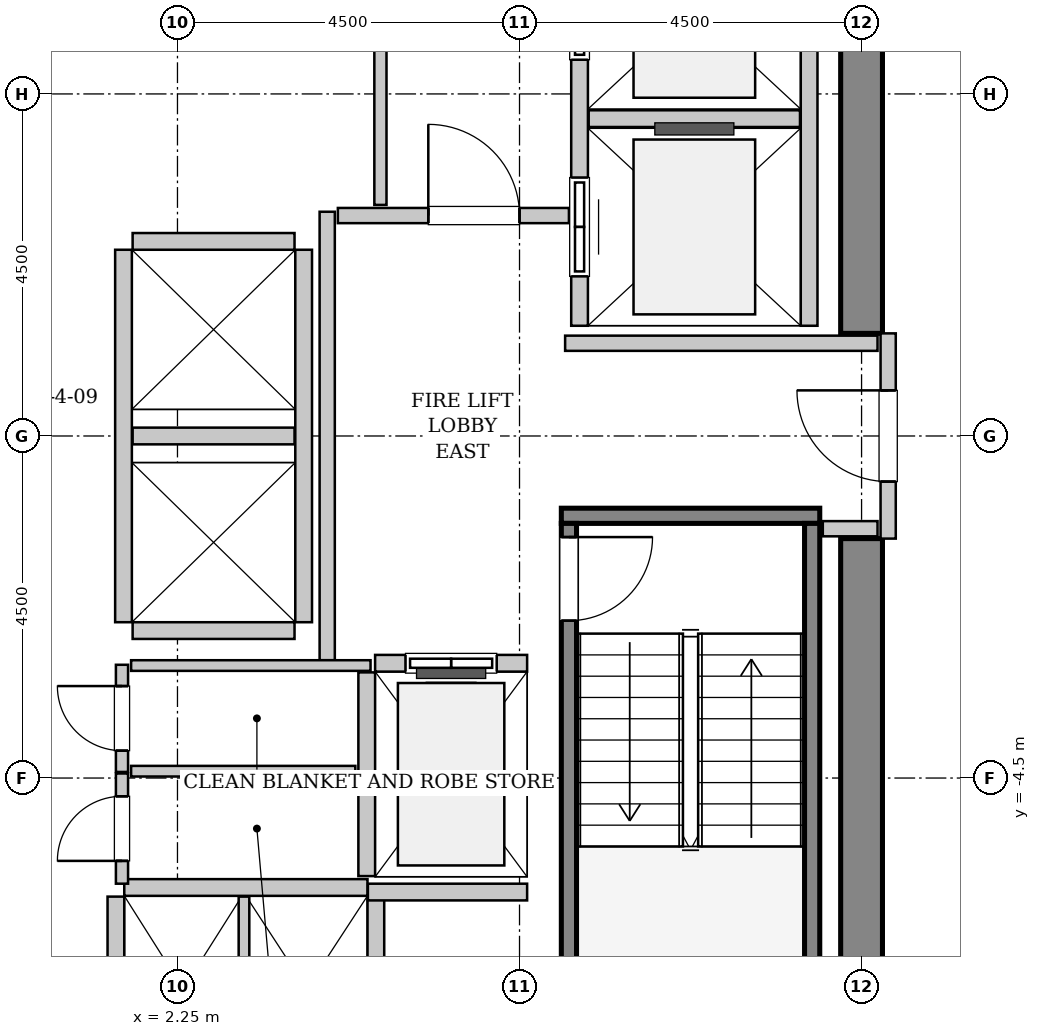
"""IFC4 building model, lengths in metres.
Left out: names, types, materials, properties, quantities, classifications, styles, units other than length and angle.
Written with IfcOpenShell. Run it as: python <this file> out.ifc"""

import sys

from ifc_helpers import new_model, si_unit, direction, frame, frame_2d, origin, place, context, subcontext, project, spatial, rectangle, extrude, source, transform, mapped, element, fill, save


model = new_model("IFC4")
c1 = context("Model", 3, precision=1e-05, world=origin(), true_north=direction((0.0, 1.0)))
c2 = subcontext(c1, "Body", "Model", "MODEL_VIEW")
j1 = project(units=[si_unit("LENGTHUNIT", "METRE"), si_unit("PLANEANGLEUNIT", "RADIAN")], contexts=[c1])
p1 = place(None, origin())
s1 = spatial("IfcSite", under=j1, at=p1, CompositionType="ELEMENT")
p2 = place(p1, origin())
s2 = spatial("IfcBuilding", under=s1, at=p2, CompositionType="ELEMENT")
p3 = place(p2, frame((0.0, 0.0, 94.6)))
s3 = spatial("IfcBuildingStorey", under=s2, at=p3, CompositionType="ELEMENT", Elevation=94.6)
m1 = source(origin(), c2, "Body", "SweptSolid", [
    extrude(rectangle(XDim=7.375, YDim=0.55, at=frame_2d((3.688, 0.0))), origin(), (0.0, 0.0, 1.0), 3.8),
])
for number, where, z_axis, x_axis in (
    (1, (11.25, -8.725, 0.0), (0.0, 0.0, 1.0), (0.0, 1.0, 0.0)),
    (2, (11.25, 1.35, 0.0), (0.0, 0.0, 1.0), (0.0, 1.0, 0.0)),
):
    element("IfcWall", number, at=place(p3, frame(where, z_axis=z_axis, x_axis=x_axis)), inside=s3, PredefinedType="SHEAR", context=c2, shape_type="MappedRepresentation", body=[
        mapped(m1, transform((0.0, 0.0, 0.0), x_axis=(1.0, 0.0, 0.0), y_axis=(0.0, 1.0, 0.0), z_axis=(0.0, 0.0, 1.0), scale=1.0)),
    ])
m2 = source(origin(), c2, "Body", "SweptSolid", [
    extrude(rectangle(XDim=3.4, YDim=0.2, at=frame_2d((1.7, 0.0))), origin(), (0.0, 0.0, 1.0), 3.8),
])
p4 = place(p3, frame((7.3, -1.05, 0.0), z_axis=(0.0, 0.0, 1.0), x_axis=(1.0, 0.0, 0.0)))
e3 = element("IfcWall", 3, at=p4, inside=s3, PredefinedType="SOLIDWALL", context=c2, shape_type="MappedRepresentation", body=[
    mapped(m2, transform((0.0, 0.0, 0.0), x_axis=(1.0, 0.0, 0.0), y_axis=(0.0, 1.0, 0.0), z_axis=(0.0, 0.0, 1.0), scale=1.0)),
])
m3 = source(origin(), c2, "Body", "SweptSolid", [
    extrude(rectangle(XDim=7.1, YDim=0.2, at=frame_2d((3.55, 0.0))), origin(), (0.0, 0.0, 1.0), 3.8),
])
p5 = place(p3, frame((7.4, -1.15, 0.0), z_axis=(0.0, 0.0, 1.0), x_axis=(0.0, -1.0, 0.0)))
e4 = element("IfcWall", 4, at=p5, inside=s3, PredefinedType="SOLIDWALL", context=c2, shape_type="MappedRepresentation", body=[
    mapped(m3, transform((0.0, 0.0, 0.0), x_axis=(1.0, 0.0, 0.0), y_axis=(0.0, 1.0, 0.0), z_axis=(0.0, 0.0, 1.0), scale=1.0)),
])
p6 = place(p5, frame((0.18, 0.0, 0.0)))
e5 = element("IfcOpeningElement", 5, at=p6, cuts=e4, PredefinedType="OPENING", context=c2, shape_type="SweptSolid", body=[
    extrude(rectangle(XDim=1.1, YDim=2.15, at=frame_2d((0.55, 1.075))), frame((0.0, 0.11, 0.0), z_axis=(0.0, -1.0, 0.0), x_axis=(1.0, 0.0, 0.0)), (0.0, 0.0, 1.0), 0.22),
])
p7 = place(p3, frame((10.6, -1.15, 0.0), z_axis=(0.0, 0.0, 1.0), x_axis=(0.0, -1.0, 0.0)))
e6 = element("IfcWall", 6, at=p7, inside=s3, PredefinedType="SOLIDWALL", context=c2, shape_type="MappedRepresentation", body=[
    mapped(m3, transform((0.0, 0.0, 0.0), x_axis=(1.0, 0.0, 0.0), y_axis=(0.0, 1.0, 0.0), z_axis=(0.0, 0.0, 1.0), scale=1.0)),
])
m4 = source(origin(), c2, "Body", "SweptSolid", [
    extrude(rectangle(XDim=2.0, YDim=0.22, at=frame_2d((1.0, 0.0))), origin(), (0.0, 0.0, 1.0), 3.535),
])
p8 = place(p3, frame((6.85, -2.99, 0.0), z_axis=(0.0, 0.0, 1.0), x_axis=(-1.0, 0.0, 0.0)))
e7 = element("IfcWall", 7, at=p8, inside=s3, PredefinedType="SOLIDWALL", context=c2, shape_type="MappedRepresentation", body=[
    mapped(m4, transform((0.0, 0.0, 0.0), x_axis=(1.0, 0.0, 0.0), y_axis=(0.0, 1.0, 0.0), z_axis=(0.0, 0.0, 1.0), scale=1.0)),
])
p9 = place(p8, frame((0.4, 0.0, 0.0)))
e8 = element("IfcOpeningElement", 8, at=p9, cuts=e7, PredefinedType="OPENING", context=c2, shape_type="SweptSolid", body=[
    extrude(rectangle(XDim=1.2, YDim=2.2, at=frame_2d((0.6, 1.1))), frame((0.0, 0.12, 0.0), z_axis=(0.0, -1.0, 0.0), x_axis=(1.0, 0.0, 0.0)), (0.0, 0.0, 1.0), 0.24),
])
m5 = source(origin(), c2, "Body", "SweptSolid", [
    extrude(rectangle(XDim=2.68, YDim=0.22, at=frame_2d((1.34, 0.0))), origin(), (0.0, 0.0, 1.0), 3.535),
])
p10 = place(p3, frame((4.74, -3.11, 0.0), z_axis=(0.0, 0.0, 1.0), x_axis=(0.0, -1.0, 0.0)))
e9 = element("IfcWall", 9, at=p10, inside=s3, PredefinedType="SOLIDWALL", context=c2, shape_type="MappedRepresentation", body=[
    mapped(m5, transform((0.0, 0.0, 0.0), x_axis=(1.0, 0.0, 0.0), y_axis=(0.0, 1.0, 0.0), z_axis=(0.0, 0.0, 1.0), scale=1.0)),
])
m6 = source(origin(), c2, "Body", "SweptSolid", [
    extrude(rectangle(XDim=5.45, YDim=0.22, at=frame_2d((2.725, 0.0))), origin(), (0.0, 0.0, 1.0), 3.535),
])
p11 = place(p3, frame((7.54, 6.9, 0.0), z_axis=(0.0, 0.0, 1.0), x_axis=(0.0, -1.0, 0.0)))
e10 = element("IfcWall", 10, at=p11, inside=s3, PredefinedType="SOLIDWALL", context=c2, shape_type="MappedRepresentation", body=[
    mapped(m6, transform((0.0, 0.0, 0.0), x_axis=(1.0, 0.0, 0.0), y_axis=(0.0, 1.0, 0.0), z_axis=(0.0, 0.0, 1.0), scale=1.0)),
])
p12 = place(p11, frame((3.5, 0.0, 0.0)))
e11 = element("IfcOpeningElement", 11, at=p12, cuts=e10, PredefinedType="OPENING", context=c2, shape_type="SweptSolid", body=[
    extrude(rectangle(XDim=1.3, YDim=2.3, at=frame_2d((0.65, 1.15))), frame((0.0, 0.12, 0.0), z_axis=(0.0, -1.0, 0.0), x_axis=(1.0, 0.0, 0.0)), (0.0, 0.0, 1.0), 0.24),
])
p13 = place(p11, frame((0.65, 0.0, 0.0)))
e12 = element("IfcOpeningElement", 12, at=p13, cuts=e10, PredefinedType="OPENING", context=c2, shape_type="SweptSolid", body=[
    extrude(rectangle(XDim=1.3, YDim=2.3, at=frame_2d((0.65, 1.15))), frame((0.0, 0.12, 0.0), z_axis=(0.0, -1.0, 0.0), x_axis=(1.0, 0.0, 0.0)), (0.0, 0.0, 1.0), 0.24),
])
p14 = place(p3, frame((10.56, 1.45, 0.0), z_axis=(0.0, 0.0, 1.0), x_axis=(0.0, 1.0, 0.0)))
e13 = element("IfcWall", 13, at=p14, inside=s3, PredefinedType="SOLIDWALL", context=c2, shape_type="MappedRepresentation", body=[
    mapped(m6, transform((0.0, 0.0, 0.0), x_axis=(1.0, 0.0, 0.0), y_axis=(0.0, 1.0, 0.0), z_axis=(0.0, 0.0, 1.0), scale=1.0)),
])
m7 = source(origin(), c2, "Body", "SweptSolid", [
    extrude(rectangle(XDim=2.78, YDim=0.22, at=frame_2d((1.39, 0.0))), origin(), (0.0, 0.0, 1.0), 3.535),
])
p15 = place(p3, frame((7.66, 4.175, 0.0), z_axis=(0.0, 0.0, 1.0), x_axis=(1.0, 0.0, 0.0)))
e14 = element("IfcWall", 14, at=p15, inside=s3, PredefinedType="SOLIDWALL", context=c2, shape_type="MappedRepresentation", body=[
    mapped(m7, transform((0.0, 0.0, 0.0), x_axis=(1.0, 0.0, 0.0), y_axis=(0.0, 1.0, 0.0), z_axis=(0.0, 0.0, 1.0), scale=1.0)),
])
m8 = source(origin(), c2, "Body", "SweptSolid", [
    extrude(rectangle(XDim=3.2, YDim=0.22, at=frame_2d((1.6, 0.0))), origin(), (0.0, 0.0, 1.0), 3.535),
])
p16 = place(p3, frame((4.75, -5.94, 0.0), z_axis=(0.0, 0.0, 1.0), x_axis=(-1.0, 0.0, 0.0)))
e15 = element("IfcWall", 15, at=p16, inside=s3, PredefinedType="SOLIDWALL", context=c2, shape_type="MappedRepresentation", body=[
    mapped(m8, transform((0.0, 0.0, 0.0), x_axis=(1.0, 0.0, 0.0), y_axis=(0.0, 1.0, 0.0), z_axis=(0.0, 0.0, 1.0), scale=1.0)),
])
m9 = source(origin(), c2, "Body", "SweptSolid", [
    extrude(rectangle(XDim=2.43, YDim=0.22, at=frame_2d((1.215, 0.0))), origin(), (0.0, 0.0, 1.0), 3.535),
])
p17 = place(p3, frame((1.44, -6.06, 0.0), z_axis=(0.0, 0.0, 1.0), x_axis=(0.0, -1.0, 0.0)))
e16 = element("IfcWall", 16, at=p17, inside=s3, PredefinedType="SOLIDWALL", context=c2, shape_type="MappedRepresentation", body=[
    mapped(m9, transform((0.0, 0.0, 0.0), x_axis=(1.0, 0.0, 0.0), y_axis=(0.0, 1.0, 0.0), z_axis=(0.0, 0.0, 1.0), scale=1.0)),
])
m10 = source(origin(), c2, "Body", "SweptSolid", [
    extrude(rectangle(XDim=2.43, YDim=0.14, at=frame_2d((1.215, 0.0))), origin(), (0.0, 0.0, 1.0), 3.535),
])
p18 = place(p3, frame((3.125, -8.49, 0.0), z_axis=(0.0, 0.0, 1.0), x_axis=(0.0, 1.0, 0.0)))
e17 = element("IfcWall", 17, at=p18, inside=s3, PredefinedType="PARTITIONING", context=c2, shape_type="MappedRepresentation", body=[
    mapped(m10, transform((0.0, 0.0, 0.0), x_axis=(1.0, 0.0, 0.0), y_axis=(0.0, 1.0, 0.0), z_axis=(0.0, 0.0, 1.0), scale=1.0)),
])
p19 = place(p3, frame((4.86, -8.49, 0.0), z_axis=(0.0, 0.0, 1.0), x_axis=(0.0, 1.0, 0.0)))
e18 = element("IfcWall", 18, at=p19, inside=s3, PredefinedType="SOLIDWALL", context=c2, shape_type="MappedRepresentation", body=[
    mapped(m9, transform((0.0, 0.0, 0.0), x_axis=(1.0, 0.0, 0.0), y_axis=(0.0, 1.0, 0.0), z_axis=(0.0, 0.0, 1.0), scale=1.0)),
])
m11 = source(origin(), c2, "Body", "SweptSolid", [
    extrude(rectangle(XDim=4.9, YDim=0.22, at=frame_2d((2.45, 0.0))), origin(), (0.0, 0.0, 1.0), 3.535),
])
for number, where, z_axis, x_axis in (
    (19, (1.54, 2.45, 0.0), (0.0, 0.0, 1.0), (0.0, -1.0, 0.0)),
    (20, (3.91, -2.45, 0.0), (0.0, 0.0, 1.0), (0.0, 1.0, 0.0)),
):
    element("IfcWall", number, at=place(p3, frame(where, z_axis=z_axis, x_axis=x_axis)), inside=s3, PredefinedType="SOLIDWALL", context=c2, shape_type="MappedRepresentation", body=[
        mapped(m11, transform((0.0, 0.0, 0.0), x_axis=(1.0, 0.0, 0.0), y_axis=(0.0, 1.0, 0.0), z_axis=(0.0, 0.0, 1.0), scale=1.0)),
    ])
m12 = source(origin(), c2, "Body", "SweptSolid", [
    extrude(rectangle(XDim=2.13, YDim=0.22, at=frame_2d((1.065, 0.0))), origin(), (0.0, 0.0, 1.0), 3.535),
])
for number, where, z_axis, x_axis in (
    (21, (1.66, -2.56, 0.0), (0.0, 0.0, 1.0), (1.0, 0.0, 0.0)),
    (22, (1.66, 0.0, 0.0), (0.0, 0.0, 1.0), (1.0, 0.0, 0.0)),
    (23, (3.79, 2.56, 0.0), (0.0, 0.0, 1.0), (-1.0, 0.0, 0.0)),
):
    element("IfcWall", number, at=place(p3, frame(where, z_axis=z_axis, x_axis=x_axis)), inside=s3, PredefinedType="SOLIDWALL", context=c2, shape_type="MappedRepresentation", body=[
        mapped(m12, transform((0.0, 0.0, 0.0), x_axis=(1.0, 0.0, 0.0), y_axis=(0.0, 1.0, 0.0), z_axis=(0.0, 0.0, 1.0), scale=1.0)),
    ])
m13 = source(origin(), c2, "Body", "SweptSolid", [
    extrude(rectangle(XDim=2.095, YDim=0.22, at=frame_2d((1.048, 0.0))), origin(), (0.0, 0.0, 1.0), 3.535),
])
p20 = place(p3, frame((4.755, -6.0, 0.0), z_axis=(0.0, 0.0, 1.0), x_axis=(1.0, 0.0, 0.0)))
e24 = element("IfcWall", 24, at=p20, inside=s3, PredefinedType="SOLIDWALL", context=c2, shape_type="MappedRepresentation", body=[
    mapped(m13, transform((0.0, 0.0, 0.0), x_axis=(1.0, 0.0, 0.0), y_axis=(0.0, 1.0, 0.0), z_axis=(0.0, 0.0, 1.0), scale=1.0)),
])
m14 = source(origin(), c2, "Body", "SweptSolid", [
    extrude(rectangle(XDim=2.7, YDim=0.2, at=frame_2d((1.35, 0.0))), origin(), (0.0, 0.0, 1.0), 2.425),
])
p21 = place(p3, frame((11.6, -1.35, 0.0), z_axis=(0.0, 0.0, 1.0), x_axis=(0.0, 1.0, 0.0)))
e25 = element("IfcWall", 25, at=p21, inside=s3, PredefinedType="PARTITIONING", context=c2, shape_type="MappedRepresentation", body=[
    mapped(m14, transform((0.0, 0.0, 0.0), x_axis=(1.0, 0.0, 0.0), y_axis=(0.0, 1.0, 0.0), z_axis=(0.0, 0.0, 1.0), scale=1.0)),
])
p22 = place(p21, frame((0.75, 0.0, 0.0)))
e26 = element("IfcOpeningElement", 26, at=p22, cuts=e25, PredefinedType="OPENING", context=c2, shape_type="SweptSolid", body=[
    extrude(rectangle(XDim=1.2, YDim=2.15, at=frame_2d((0.6, 1.075))), frame((0.0, 0.11, 0.0), z_axis=(0.0, -1.0, 0.0), x_axis=(1.0, 0.0, 0.0)), (0.0, 0.0, 1.0), 0.22),
])
m15 = source(origin(), c2, "Body", "SweptSolid", [
    extrude(rectangle(XDim=5.9, YDim=0.2, at=frame_2d((2.95, 0.0))), origin(), (0.0, 0.0, 1.0), 3.535),
])
p23 = place(p3, frame((4.22, -2.95, 0.0), z_axis=(0.0, 0.0, 1.0), x_axis=(0.0, 1.0, 0.0)))
e27 = element("IfcWall", 27, at=p23, inside=s3, PredefinedType="PARTITIONING", context=c2, shape_type="MappedRepresentation", body=[
    mapped(m15, transform((0.0, 0.0, 0.0), x_axis=(1.0, 0.0, 0.0), y_axis=(0.0, 1.0, 0.0), z_axis=(0.0, 0.0, 1.0), scale=1.0)),
])
m16 = source(origin(), c2, "Body", "SweptSolid", [
    extrude(rectangle(XDim=3.04, YDim=0.2, at=frame_2d((1.52, 0.0))), origin(), (0.0, 0.0, 1.0), 3.535),
])
p24 = place(p3, frame((4.36, 2.9, 0.0), z_axis=(0.0, 0.0, 1.0), x_axis=(1.0, 0.0, 0.0)))
e28 = element("IfcWall", 28, at=p24, inside=s3, PredefinedType="PARTITIONING", context=c2, shape_type="MappedRepresentation", body=[
    mapped(m16, transform((0.0, 0.0, 0.0), x_axis=(1.0, 0.0, 0.0), y_axis=(0.0, 1.0, 0.0), z_axis=(0.0, 0.0, 1.0), scale=1.0)),
])
p25 = place(p24, frame((1.19, 0.0, 0.0)))
e29 = element("IfcOpeningElement", 29, at=p25, cuts=e28, PredefinedType="OPENING", context=c2, shape_type="SweptSolid", body=[
    extrude(rectangle(XDim=1.2, YDim=2.15, at=frame_2d((0.6, 1.075))), frame((0.0, 0.11, 0.0), z_axis=(0.0, -1.0, 0.0), x_axis=(1.0, 0.0, 0.0)), (0.0, 0.0, 1.0), 0.22),
])
m17 = source(origin(), c2, "Body", "SweptSolid", [
    extrude(rectangle(XDim=4.11, YDim=0.2, at=frame_2d((2.055, 0.0))), origin(), (0.0, 0.0, 1.0), 3.535),
])
p26 = place(p3, frame((7.35, 1.22, 0.0), z_axis=(0.0, 0.0, 1.0), x_axis=(1.0, 0.0, 0.0)))
e30 = element("IfcWall", 30, at=p26, inside=s3, PredefinedType="PARTITIONING", context=c2, shape_type="MappedRepresentation", body=[
    mapped(m17, transform((0.0, 0.0, 0.0), x_axis=(1.0, 0.0, 0.0), y_axis=(0.0, 1.0, 0.0), z_axis=(0.0, 0.0, 1.0), scale=1.0)),
])
m18 = source(origin(), c2, "Body", "SweptSolid", [
    extrude(rectangle(XDim=0.72, YDim=0.2, at=frame_2d((0.36, 0.0))), origin(), (0.0, 0.0, 1.0), 3.535),
])
p27 = place(p3, frame((10.74, -1.22, 0.0), z_axis=(0.0, 0.0, 1.0), x_axis=(1.0, 0.0, 0.0)))
e31 = element("IfcWall", 31, at=p27, inside=s3, PredefinedType="PARTITIONING", context=c2, shape_type="MappedRepresentation", body=[
    mapped(m18, transform((0.0, 0.0, 0.0), x_axis=(1.0, 0.0, 0.0), y_axis=(0.0, 1.0, 0.0), z_axis=(0.0, 0.0, 1.0), scale=1.0)),
])
m19 = source(origin(), c2, "Body", "SweptSolid", [
    extrude(rectangle(XDim=3.015, YDim=0.16, at=frame_2d((1.507, 0.0))), origin(), (0.0, 0.0, 1.0), 3.535),
])
p28 = place(p3, frame((4.92, 3.04, 0.0), z_axis=(0.0, 0.0, 1.0), x_axis=(0.0, 1.0, 0.0)))
e32 = element("IfcWall", 32, at=p28, inside=s3, PredefinedType="PARTITIONING", context=c2, shape_type="MappedRepresentation", body=[
    mapped(m19, transform((0.0, 0.0, 0.0), x_axis=(1.0, 0.0, 0.0), y_axis=(0.0, 1.0, 0.0), z_axis=(0.0, 0.0, 1.0), scale=1.0)),
])
m20 = source(origin(), c2, "Body", "SweptSolid", [
    extrude(rectangle(XDim=1.41, YDim=0.16, at=frame_2d((0.705, 0.0))), origin(), (0.0, 0.0, 1.0), 3.535),
])
p29 = place(p3, frame((1.52, -4.42, 0.0), z_axis=(0.0, 0.0, 1.0), x_axis=(0.0, 1.0, 0.0)))
e33 = element("IfcWall", 33, at=p29, inside=s3, PredefinedType="PARTITIONING", context=c2, shape_type="MappedRepresentation", body=[
    mapped(m20, transform((0.0, 0.0, 0.0), x_axis=(1.0, 0.0, 0.0), y_axis=(0.0, 1.0, 0.0), z_axis=(0.0, 0.0, 1.0), scale=1.0)),
])
p30 = place(p29, frame((0.28, 0.0, 0.0)))
e34 = element("IfcOpeningElement", 34, at=p30, cuts=e33, PredefinedType="OPENING", context=c2, shape_type="SweptSolid", body=[
    extrude(rectangle(XDim=0.85, YDim=2.1, at=frame_2d((0.425, 1.05))), frame((0.0, 0.09, 0.0), z_axis=(0.0, -1.0, 0.0), x_axis=(1.0, 0.0, 0.0)), (0.0, 0.0, 1.0), 0.18),
])
m21 = source(origin(), c2, "Body", "SweptSolid", [
    extrude(rectangle(XDim=3.15, YDim=0.14, at=frame_2d((1.575, 0.0))), origin(), (0.0, 0.0, 1.0), 3.535),
])
p31 = place(p3, frame((1.64, -3.02, 0.0), z_axis=(0.0, 0.0, 1.0), x_axis=(1.0, 0.0, 0.0)))
e35 = element("IfcWall", 35, at=p31, inside=s3, PredefinedType="PARTITIONING", context=c2, shape_type="MappedRepresentation", body=[
    mapped(m21, transform((0.0, 0.0, 0.0), x_axis=(1.0, 0.0, 0.0), y_axis=(0.0, 1.0, 0.0), z_axis=(0.0, 0.0, 1.0), scale=1.0)),
])
m22 = source(origin(), c2, "Body", "SweptSolid", [
    extrude(rectangle(XDim=2.95, YDim=0.14, at=frame_2d((1.475, 0.0))), origin(), (0.0, 0.0, 1.0), 3.535),
])
p32 = place(p3, frame((1.64, -4.41, 0.0), z_axis=(0.0, 0.0, 1.0), x_axis=(1.0, 0.0, 0.0)))
e36 = element("IfcWall", 36, at=p32, inside=s3, PredefinedType="PARTITIONING", context=c2, shape_type="MappedRepresentation", body=[
    mapped(m22, transform((0.0, 0.0, 0.0), x_axis=(1.0, 0.0, 0.0), y_axis=(0.0, 1.0, 0.0), z_axis=(0.0, 0.0, 1.0), scale=1.0)),
])
m23 = source(origin(), c2, "Body", "SweptSolid", [
    extrude(rectangle(XDim=1.45, YDim=0.16, at=frame_2d((0.725, 0.0))), origin(), (0.0, 0.0, 1.0), 3.535),
])
p33 = place(p3, frame((1.52, -5.89, 0.0), z_axis=(0.0, 0.0, 1.0), x_axis=(0.0, 1.0, 0.0)))
e37 = element("IfcWall", 37, at=p33, inside=s3, PredefinedType="PARTITIONING", context=c2, shape_type="MappedRepresentation", body=[
    mapped(m23, transform((0.0, 0.0, 0.0), x_axis=(1.0, 0.0, 0.0), y_axis=(0.0, 1.0, 0.0), z_axis=(0.0, 0.0, 1.0), scale=1.0)),
])
p34 = place(p33, frame((0.3, 0.0, 0.0)))
e38 = element("IfcOpeningElement", 38, at=p34, cuts=e37, PredefinedType="OPENING", context=c2, shape_type="SweptSolid", body=[
    extrude(rectangle(XDim=0.85, YDim=2.1, at=frame_2d((0.425, 1.05))), frame((0.0, 0.09, 0.0), z_axis=(0.0, -1.0, 0.0), x_axis=(1.0, 0.0, 0.0)), (0.0, 0.0, 1.0), 0.18),
])
m24 = source(origin(), c2, "Body", "SweptSolid", [
    extrude(rectangle(XDim=1.1, YDim=2.15, at=frame_2d((0.55, 1.075))), frame((0.0, 0.025, 0.0), z_axis=(0.0, -1.0, 0.0), x_axis=(1.0, 0.0, 0.0)), (0.0, 0.0, 1.0), 0.05),
])
p35 = place(p6, origin())
e39 = element("IfcDoor", 39, at=p35, inside=s3, OperationType="SINGLE_SWING_LEFT", PredefinedType="DOOR", context=c2, shape_type="MappedRepresentation", body=[
    mapped(m24, transform((0.0, 0.0, 0.0), x_axis=(1.0, 0.0, 0.0), y_axis=(0.0, 1.0, 0.0), z_axis=(0.0, 0.0, 1.0), scale=1.0)),
])
fill(e5, e39)
m25 = source(origin(), c2, "Body", "SweptSolid", [
    extrude(rectangle(XDim=1.2, YDim=2.2, at=frame_2d((0.6, 1.1))), frame((0.0, 0.025, 0.0), z_axis=(0.0, -1.0, 0.0), x_axis=(1.0, 0.0, 0.0)), (0.0, 0.0, 1.0), 0.05),
])
p36 = place(p9, origin())
e40 = element("IfcDoor", 40, at=p36, inside=s3, OperationType="SLIDING_TO_LEFT", PredefinedType="DOOR", context=c2, shape_type="MappedRepresentation", body=[
    mapped(m25, transform((0.0, 0.0, 0.0), x_axis=(1.0, 0.0, 0.0), y_axis=(0.0, 1.0, 0.0), z_axis=(0.0, 0.0, 1.0), scale=1.0)),
])
fill(e8, e40)
m26 = source(origin(), c2, "Body", "SweptSolid", [
    extrude(rectangle(XDim=1.3, YDim=2.3, at=frame_2d((0.65, 1.15))), frame((0.0, 0.025, 0.0), z_axis=(0.0, -1.0, 0.0), x_axis=(1.0, 0.0, 0.0)), (0.0, 0.0, 1.0), 0.05),
])
p37 = place(p12, origin())
e41 = element("IfcDoor", 41, at=p37, inside=s3, OperationType="SLIDING_TO_RIGHT", PredefinedType="DOOR", context=c2, shape_type="MappedRepresentation", body=[
    mapped(m26, transform((0.0, 0.0, 0.0), x_axis=(1.0, 0.0, 0.0), y_axis=(0.0, 1.0, 0.0), z_axis=(0.0, 0.0, 1.0), scale=1.0)),
])
fill(e11, e41)
p38 = place(p13, origin())
e42 = element("IfcDoor", 42, at=p38, inside=s3, OperationType="SLIDING_TO_RIGHT", PredefinedType="DOOR", context=c2, shape_type="MappedRepresentation", body=[
    mapped(m26, transform((0.0, 0.0, 0.0), x_axis=(1.0, 0.0, 0.0), y_axis=(0.0, 1.0, 0.0), z_axis=(0.0, 0.0, 1.0), scale=1.0)),
])
fill(e12, e42)
m27 = source(origin(), c2, "Body", "SweptSolid", [
    extrude(rectangle(XDim=1.2, YDim=2.15, at=frame_2d((0.6, 1.075))), frame((0.0, 0.025, 0.0), z_axis=(0.0, -1.0, 0.0), x_axis=(1.0, 0.0, 0.0)), (0.0, 0.0, 1.0), 0.05),
])
p39 = place(p22, origin())
e43 = element("IfcDoor", 43, at=p39, inside=s3, OperationType="SINGLE_SWING_RIGHT", PredefinedType="DOOR", context=c2, shape_type="MappedRepresentation", body=[
    mapped(m27, transform((0.0, 0.0, 0.0), x_axis=(1.0, 0.0, 0.0), y_axis=(0.0, 1.0, 0.0), z_axis=(0.0, 0.0, 1.0), scale=1.0)),
])
fill(e26, e43)
p40 = place(p25, origin())
e44 = element("IfcDoor", 44, at=p40, inside=s3, OperationType="SINGLE_SWING_LEFT", PredefinedType="DOOR", context=c2, shape_type="MappedRepresentation", body=[
    mapped(m27, transform((0.0, 0.0, 0.0), x_axis=(1.0, 0.0, 0.0), y_axis=(0.0, 1.0, 0.0), z_axis=(0.0, 0.0, 1.0), scale=1.0)),
])
fill(e29, e44)
m28 = source(origin(), c2, "Body", "SweptSolid", [
    extrude(rectangle(XDim=0.85, YDim=2.1, at=frame_2d((0.425, 1.05))), frame((0.0, 0.025, 0.0), z_axis=(0.0, -1.0, 0.0), x_axis=(1.0, 0.0, 0.0)), (0.0, 0.0, 1.0), 0.05),
])
p41 = place(p30, origin())
e45 = element("IfcDoor", 45, at=p41, inside=s3, OperationType="SINGLE_SWING_RIGHT", PredefinedType="DOOR", context=c2, shape_type="MappedRepresentation", body=[
    mapped(m28, transform((0.0, 0.0, 0.0), x_axis=(1.0, 0.0, 0.0), y_axis=(0.0, 1.0, 0.0), z_axis=(0.0, 0.0, 1.0), scale=1.0)),
])
fill(e34, e45)
p42 = place(p34, origin())
e46 = element("IfcDoor", 46, at=p42, inside=s3, OperationType="SINGLE_SWING_LEFT", PredefinedType="DOOR", context=c2, shape_type="MappedRepresentation", body=[
    mapped(m28, transform((0.0, 0.0, 0.0), x_axis=(1.0, 0.0, 0.0), y_axis=(0.0, 1.0, 0.0), z_axis=(0.0, 0.0, 1.0), scale=1.0)),
])
fill(e38, e46)
save(model, sys.argv[1])
